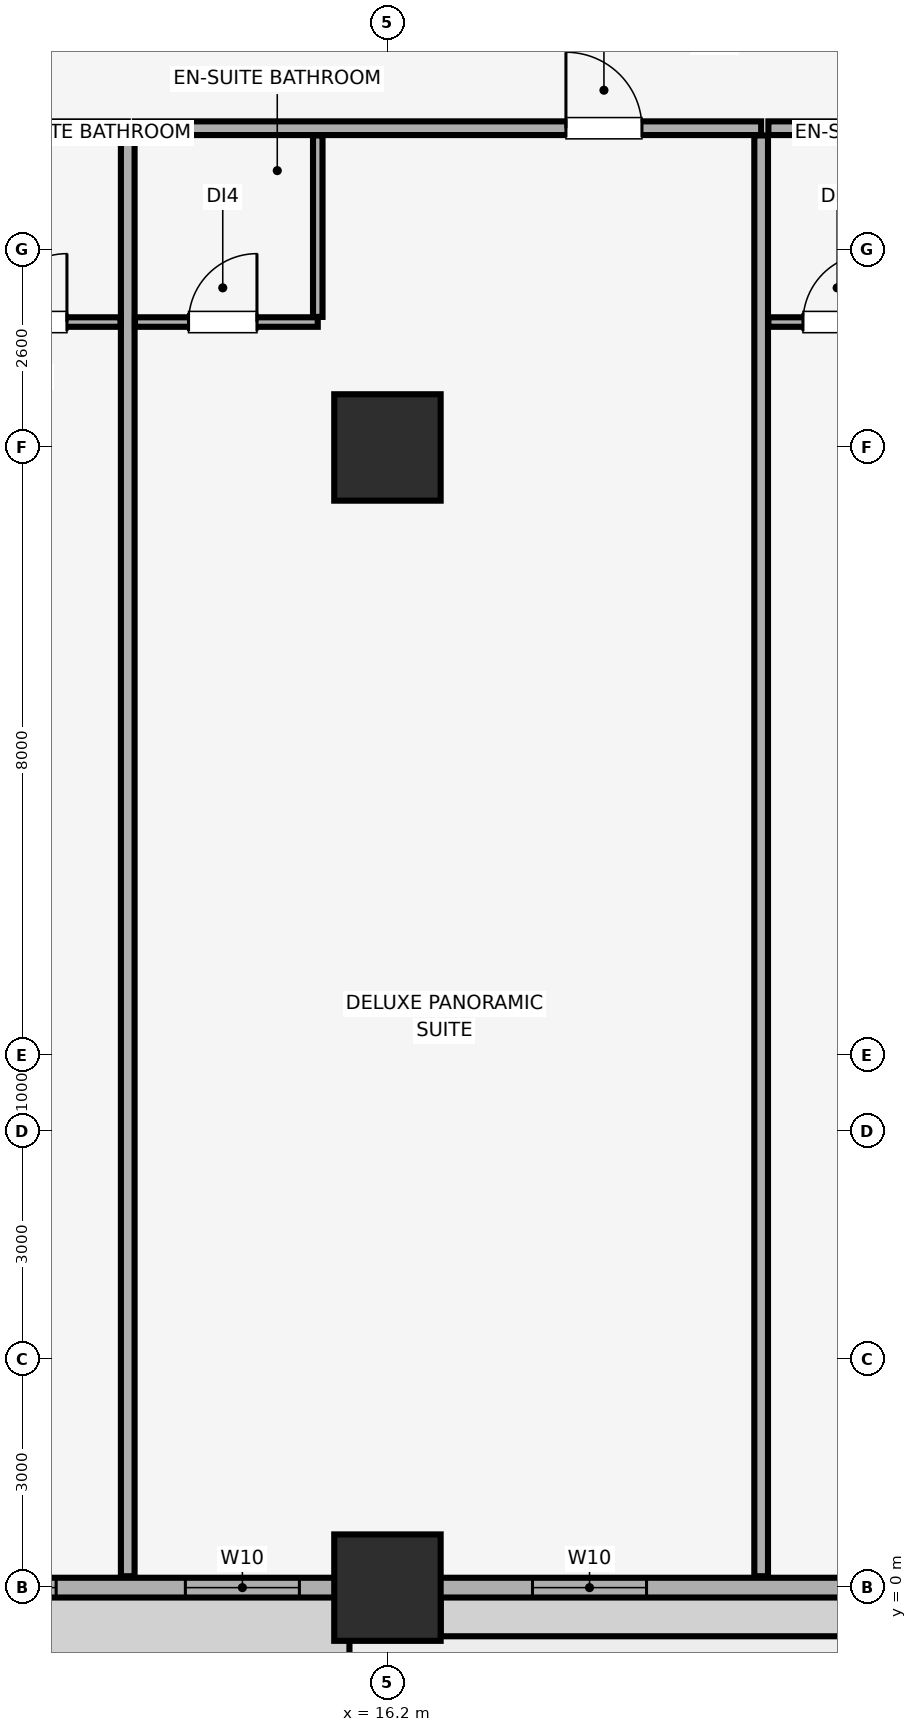
"""IFC4 building model, lengths in metres.
Left out: names, types, materials, properties, quantities, classifications, styles, units other than length and angle.
Written with IfcOpenShell. Run it as: python <this file> out.ifc"""

import sys

from ifc_helpers import new_model, si_unit, direction, frame, frame_2d, origin, origin_2d, place, context, subcontext, project, spatial, rectangle, extrude, element, fill, save


model = new_model("IFC4")
c1 = context("Model", 3, precision=1e-05, world=origin(), true_north=direction((0.0, 1.0)))
c2 = subcontext(c1, "Body", "Model", "MODEL_VIEW")
j1 = project(units=[si_unit("LENGTHUNIT", "METRE"), si_unit("PLANEANGLEUNIT", "RADIAN")], contexts=[c1])
p1 = place(None, origin())
s1 = spatial("IfcSite", under=j1, at=p1, CompositionType="ELEMENT")
p2 = place(p1, origin())
s2 = spatial("IfcBuilding", under=s1, at=p2, CompositionType="ELEMENT")
p3 = place(p2, frame((0.0, 0.0, 76.4)))
s3 = spatial("IfcBuildingStorey", under=s2, at=p3, CompositionType="ELEMENT", Elevation=76.4)
for number, where, z_axis, x_axis in (
    (1, (16.2, 0.0, 0.0), (0.0, 0.0, 1.0), (1.0, 0.0, 0.0)),
    (2, (16.2, 15.0, 0.0), (0.0, 0.0, 1.0), (1.0, 0.0, 0.0)),
):
    element("IfcColumn", number, at=place(p3, frame(where, z_axis=z_axis, x_axis=x_axis)), inside=s3, PredefinedType="COLUMN", context=c2, shape_type="SweptSolid", body=[
        extrude(rectangle(XDim=1.4, YDim=1.4, at=origin_2d()), origin(), (0.0, 0.0, 1.0), 3.4),
    ])
p4 = place(p3, frame((4.2, 0.0, 0.0), z_axis=(0.0, 0.0, 1.0), x_axis=(1.0, 0.0, 0.0)))
e3 = element("IfcWall", 3, at=p4, inside=s3, PredefinedType="SOLIDWALL", context=c2, shape_type="SweptSolid", body=[
    extrude(rectangle(XDim=75.6, YDim=0.26, at=frame_2d((37.8, 0.0))), origin(), (0.0, 0.0, 1.0), 2.45),
])
p5 = place(p4, frame((21.383, 0.0, 0.0)))
e4 = element("IfcOpeningElement", 4, at=p5, cuts=e3, PredefinedType="OPENING", context=c2, shape_type="SweptSolid", body=[
    extrude(rectangle(XDim=1.1, YDim=2.15, at=frame_2d((0.55, 1.075))), frame((0.0, 0.14, 0.0), z_axis=(0.0, -1.0, 0.0), x_axis=(1.0, 0.0, 0.0)), (0.0, 0.0, 1.0), 0.28),
])
p6 = place(p4, frame((37.25, 0.0, 0.0)))
e5 = element("IfcOpeningElement", 5, at=p6, cuts=e3, PredefinedType="OPENING", context=c2, shape_type="SweptSolid", body=[
    extrude(rectangle(XDim=1.1, YDim=2.15, at=frame_2d((0.55, 1.075))), frame((0.0, 0.14, 0.0), z_axis=(0.0, -1.0, 0.0), x_axis=(1.0, 0.0, 0.0)), (0.0, 0.0, 1.0), 0.28),
])
p7 = place(p4, frame((53.117, 0.0, 0.0)))
e6 = element("IfcOpeningElement", 6, at=p7, cuts=e3, PredefinedType="OPENING", context=c2, shape_type="SweptSolid", body=[
    extrude(rectangle(XDim=1.1, YDim=2.15, at=frame_2d((0.55, 1.075))), frame((0.0, 0.14, 0.0), z_axis=(0.0, -1.0, 0.0), x_axis=(1.0, 0.0, 0.0)), (0.0, 0.0, 1.0), 0.28),
])
p8 = place(p4, frame((1.485, 0.0, 0.85)))
e7 = element("IfcOpeningElement", 7, at=p8, cuts=e3, PredefinedType="OPENING", context=c2, shape_type="SweptSolid", body=[
    extrude(rectangle(XDim=1.5, YDim=1.4, at=frame_2d((0.75, 0.7))), frame((0.0, 0.14, 0.0), z_axis=(0.0, -1.0, 0.0), x_axis=(1.0, 0.0, 0.0)), (0.0, 0.0, 1.0), 0.28),
])
p9 = place(p4, frame((6.142, 0.0, 0.85)))
e8 = element("IfcOpeningElement", 8, at=p9, cuts=e3, PredefinedType="OPENING", context=c2, shape_type="SweptSolid", body=[
    extrude(rectangle(XDim=1.5, YDim=1.4, at=frame_2d((0.75, 0.7))), frame((0.0, 0.14, 0.0), z_axis=(0.0, -1.0, 0.0), x_axis=(1.0, 0.0, 0.0)), (0.0, 0.0, 1.0), 0.28),
])
p10 = place(p4, frame((9.342, 0.0, 0.85)))
e9 = element("IfcOpeningElement", 9, at=p10, cuts=e3, PredefinedType="OPENING", context=c2, shape_type="SweptSolid", body=[
    extrude(rectangle(XDim=1.5, YDim=1.4, at=frame_2d((0.75, 0.7))), frame((0.0, 0.14, 0.0), z_axis=(0.0, -1.0, 0.0), x_axis=(1.0, 0.0, 0.0)), (0.0, 0.0, 1.0), 0.28),
])
p11 = place(p4, frame((13.908, 0.0, 0.85)))
e10 = element("IfcOpeningElement", 10, at=p11, cuts=e3, PredefinedType="OPENING", context=c2, shape_type="SweptSolid", body=[
    extrude(rectangle(XDim=1.5, YDim=1.4, at=frame_2d((0.75, 0.7))), frame((0.0, 0.14, 0.0), z_axis=(0.0, -1.0, 0.0), x_axis=(1.0, 0.0, 0.0)), (0.0, 0.0, 1.0), 0.28),
])
p12 = place(p4, frame((23.202, 0.0, 0.85)))
e11 = element("IfcOpeningElement", 11, at=p12, cuts=e3, PredefinedType="OPENING", context=c2, shape_type="SweptSolid", body=[
    extrude(rectangle(XDim=1.5, YDim=1.4, at=frame_2d((0.75, 0.7))), frame((0.0, 0.14, 0.0), z_axis=(0.0, -1.0, 0.0), x_axis=(1.0, 0.0, 0.0)), (0.0, 0.0, 1.0), 0.28),
])
p13 = place(p4, frame((29.25, 0.0, 0.85)))
e12 = element("IfcOpeningElement", 12, at=p13, cuts=e3, PredefinedType="OPENING", context=c2, shape_type="SweptSolid", body=[
    extrude(rectangle(XDim=1.5, YDim=1.4, at=frame_2d((0.75, 0.7))), frame((0.0, 0.14, 0.0), z_axis=(0.0, -1.0, 0.0), x_axis=(1.0, 0.0, 0.0)), (0.0, 0.0, 1.0), 0.28),
])
p14 = place(p4, frame((34.79, 0.0, 0.85)))
e13 = element("IfcOpeningElement", 13, at=p14, cuts=e3, PredefinedType="OPENING", context=c2, shape_type="SweptSolid", body=[
    extrude(rectangle(XDim=1.5, YDim=1.4, at=frame_2d((0.75, 0.7))), frame((0.0, 0.14, 0.0), z_axis=(0.0, -1.0, 0.0), x_axis=(1.0, 0.0, 0.0)), (0.0, 0.0, 1.0), 0.28),
])
p15 = place(p4, frame((39.31, 0.0, 0.85)))
e14 = element("IfcOpeningElement", 14, at=p15, cuts=e3, PredefinedType="OPENING", context=c2, shape_type="SweptSolid", body=[
    extrude(rectangle(XDim=1.5, YDim=1.4, at=frame_2d((0.75, 0.7))), frame((0.0, 0.14, 0.0), z_axis=(0.0, -1.0, 0.0), x_axis=(1.0, 0.0, 0.0)), (0.0, 0.0, 1.0), 0.28),
])
p16 = place(p4, frame((44.85, 0.0, 0.85)))
e15 = element("IfcOpeningElement", 15, at=p16, cuts=e3, PredefinedType="OPENING", context=c2, shape_type="SweptSolid", body=[
    extrude(rectangle(XDim=1.5, YDim=1.4, at=frame_2d((0.75, 0.7))), frame((0.0, 0.14, 0.0), z_axis=(0.0, -1.0, 0.0), x_axis=(1.0, 0.0, 0.0)), (0.0, 0.0, 1.0), 0.28),
])
p17 = place(p4, frame((50.848, 0.0, 0.85)))
e16 = element("IfcOpeningElement", 16, at=p17, cuts=e3, PredefinedType="OPENING", context=c2, shape_type="SweptSolid", body=[
    extrude(rectangle(XDim=1.5, YDim=1.4, at=frame_2d((0.75, 0.7))), frame((0.0, 0.14, 0.0), z_axis=(0.0, -1.0, 0.0), x_axis=(1.0, 0.0, 0.0)), (0.0, 0.0, 1.0), 0.28),
])
p18 = place(p4, frame((60.142, 0.0, 0.85)))
e17 = element("IfcOpeningElement", 17, at=p18, cuts=e3, PredefinedType="OPENING", context=c2, shape_type="SweptSolid", body=[
    extrude(rectangle(XDim=1.5, YDim=1.4, at=frame_2d((0.75, 0.7))), frame((0.0, 0.14, 0.0), z_axis=(0.0, -1.0, 0.0), x_axis=(1.0, 0.0, 0.0)), (0.0, 0.0, 1.0), 0.28),
])
p19 = place(p4, frame((64.708, 0.0, 0.85)))
e18 = element("IfcOpeningElement", 18, at=p19, cuts=e3, PredefinedType="OPENING", context=c2, shape_type="SweptSolid", body=[
    extrude(rectangle(XDim=1.5, YDim=1.4, at=frame_2d((0.75, 0.7))), frame((0.0, 0.14, 0.0), z_axis=(0.0, -1.0, 0.0), x_axis=(1.0, 0.0, 0.0)), (0.0, 0.0, 1.0), 0.28),
])
p20 = place(p4, frame((67.908, 0.0, 0.85)))
e19 = element("IfcOpeningElement", 19, at=p20, cuts=e3, PredefinedType="OPENING", context=c2, shape_type="SweptSolid", body=[
    extrude(rectangle(XDim=1.5, YDim=1.4, at=frame_2d((0.75, 0.7))), frame((0.0, 0.14, 0.0), z_axis=(0.0, -1.0, 0.0), x_axis=(1.0, 0.0, 0.0)), (0.0, 0.0, 1.0), 0.28),
])
p21 = place(p4, frame((72.615, 0.0, 0.85)))
e20 = element("IfcOpeningElement", 20, at=p21, cuts=e3, PredefinedType="OPENING", context=c2, shape_type="SweptSolid", body=[
    extrude(rectangle(XDim=1.5, YDim=1.4, at=frame_2d((0.75, 0.7))), frame((0.0, 0.14, 0.0), z_axis=(0.0, -1.0, 0.0), x_axis=(1.0, 0.0, 0.0)), (0.0, 0.0, 1.0), 0.28),
])
p22 = place(p3, frame((0.15, 19.2, 0.0), z_axis=(0.0, 0.0, 1.0), x_axis=(1.0, 0.0, 0.0)))
e21 = element("IfcWall", 21, at=p22, inside=s3, PredefinedType="PARTITIONING", context=c2, shape_type="SweptSolid", body=[
    extrude(rectangle(XDim=12.633, YDim=0.18, at=frame_2d((6.317, 0.0))), origin(), (0.0, 0.0, 1.0), 3.4),
])
p23 = place(p22, frame((5.685, 0.0, 0.0)))
e22 = element("IfcOpeningElement", 22, at=p23, cuts=e21, PredefinedType="OPENING", context=c2, shape_type="SweptSolid", body=[
    extrude(rectangle(XDim=1.0, YDim=2.15, at=frame_2d((0.5, 1.075))), frame((0.0, 0.1, 0.0), z_axis=(0.0, -1.0, 0.0), x_axis=(1.0, 0.0, 0.0)), (0.0, 0.0, 1.0), 0.2),
])
p24 = place(p3, frame((12.783, 0.15, 0.0), z_axis=(0.0, 0.0, 1.0), x_axis=(0.0, 1.0, 0.0)))
e23 = element("IfcWall", 23, at=p24, inside=s3, PredefinedType="PARTITIONING", context=c2, shape_type="SweptSolid", body=[
    extrude(rectangle(XDim=18.955, YDim=0.18, at=frame_2d((9.478, 0.0))), origin(), (0.0, 0.0, 1.0), 2.8),
])
p25 = place(p3, frame((10.283, 16.65, 0.0), z_axis=(0.0, 0.0, 1.0), x_axis=(1.0, 0.0, 0.0)))
e24 = element("IfcWall", 24, at=p25, inside=s3, PredefinedType="PARTITIONING", context=c2, shape_type="SweptSolid", body=[
    extrude(rectangle(XDim=2.405, YDim=0.125, at=frame_2d((1.203, 0.0))), origin(), (0.0, 0.0, 1.0), 3.4),
])
p26 = place(p25, frame((0.8, 0.0, 0.0)))
e25 = element("IfcOpeningElement", 25, at=p26, cuts=e24, PredefinedType="OPENING", context=c2, shape_type="SweptSolid", body=[
    extrude(rectangle(XDim=0.9, YDim=2.1, at=frame_2d((0.45, 1.05))), frame((0.0, 0.073, 0.0), z_axis=(0.0, -1.0, 0.0), x_axis=(1.0, 0.0, 0.0)), (0.0, 0.0, 1.0), 0.145),
])
p27 = place(p3, frame((12.878, 19.2, 0.0), z_axis=(0.0, 0.0, 1.0), x_axis=(1.0, 0.0, 0.0)))
e26 = element("IfcWall", 26, at=p27, inside=s3, PredefinedType="PARTITIONING", context=c2, shape_type="SweptSolid", body=[
    extrude(rectangle(XDim=8.238, YDim=0.18, at=frame_2d((4.119, 0.0))), origin(), (0.0, 0.0, 1.0), 3.4),
])
p28 = place(p27, frame((5.67, 0.0, 0.0)))
e27 = element("IfcOpeningElement", 27, at=p28, cuts=e26, PredefinedType="OPENING", context=c2, shape_type="SweptSolid", body=[
    extrude(rectangle(XDim=1.0, YDim=2.15, at=frame_2d((0.5, 1.075))), frame((0.0, 0.1, 0.0), z_axis=(0.0, -1.0, 0.0), x_axis=(1.0, 0.0, 0.0)), (0.0, 0.0, 1.0), 0.2),
])
p29 = place(p3, frame((21.117, 0.15, 0.0), z_axis=(0.0, 0.0, 1.0), x_axis=(0.0, 1.0, 0.0)))
e28 = element("IfcWall", 28, at=p29, inside=s3, PredefinedType="PARTITIONING", context=c2, shape_type="SweptSolid", body=[
    extrude(rectangle(XDim=18.955, YDim=0.18, at=frame_2d((9.478, 0.0))), origin(), (0.0, 0.0, 1.0), 3.4),
])
p30 = place(p3, frame((12.878, 16.65, 0.0), z_axis=(0.0, 0.0, 1.0), x_axis=(1.0, 0.0, 0.0)))
e29 = element("IfcWall", 29, at=p30, inside=s3, PredefinedType="PARTITIONING", context=c2, shape_type="SweptSolid", body=[
    extrude(rectangle(XDim=2.405, YDim=0.125, at=frame_2d((1.202, 0.0))), origin(), (0.0, 0.0, 1.0), 3.4),
])
p31 = place(p30, frame((0.705, 0.0, 0.0)))
e30 = element("IfcOpeningElement", 30, at=p31, cuts=e29, PredefinedType="OPENING", context=c2, shape_type="SweptSolid", body=[
    extrude(rectangle(XDim=0.9, YDim=2.1, at=frame_2d((0.45, 1.05))), frame((0.0, 0.073, 0.0), z_axis=(0.0, -1.0, 0.0), x_axis=(1.0, 0.0, 0.0)), (0.0, 0.0, 1.0), 0.145),
])
p32 = place(p3, frame((15.283, 16.718, 0.0), z_axis=(0.0, 0.0, 1.0), x_axis=(0.0, 1.0, 0.0)))
e31 = element("IfcWall", 31, at=p32, inside=s3, PredefinedType="PARTITIONING", context=c2, shape_type="SweptSolid", body=[
    extrude(rectangle(XDim=2.387, YDim=0.125, at=frame_2d((1.194, 0.0))), origin(), (0.0, 0.0, 1.0), 3.4),
])
p33 = place(p3, frame((21.212, 19.2, 0.0), z_axis=(0.0, 0.0, 1.0), x_axis=(1.0, 0.0, 0.0)))
e32 = element("IfcWall", 32, at=p33, inside=s3, PredefinedType="PARTITIONING", context=c2, shape_type="SweptSolid", body=[
    extrude(rectangle(XDim=8.238, YDim=0.18, at=frame_2d((4.119, 0.0))), origin(), (0.0, 0.0, 1.0), 3.4),
])
p34 = place(p33, frame((5.271, 0.0, 0.0)))
e33 = element("IfcOpeningElement", 33, at=p34, cuts=e32, PredefinedType="OPENING", context=c2, shape_type="SweptSolid", body=[
    extrude(rectangle(XDim=1.0, YDim=2.15, at=frame_2d((0.5, 1.075))), frame((0.0, 0.1, 0.0), z_axis=(0.0, -1.0, 0.0), x_axis=(1.0, 0.0, 0.0)), (0.0, 0.0, 1.0), 0.2),
])
p35 = place(p3, frame((21.212, 16.65, 0.0), z_axis=(0.0, 0.0, 1.0), x_axis=(1.0, 0.0, 0.0)))
e34 = element("IfcWall", 34, at=p35, inside=s3, PredefinedType="PARTITIONING", context=c2, shape_type="SweptSolid", body=[
    extrude(rectangle(XDim=2.405, YDim=0.125, at=frame_2d((1.203, 0.0))), origin(), (0.0, 0.0, 1.0), 3.4),
])
p36 = place(p35, frame((0.455, 0.0, 0.0)))
e35 = element("IfcOpeningElement", 35, at=p36, cuts=e34, PredefinedType="OPENING", context=c2, shape_type="SweptSolid", body=[
    extrude(rectangle(XDim=0.9, YDim=2.1, at=frame_2d((0.45, 1.05))), frame((0.0, 0.073, 0.0), z_axis=(0.0, -1.0, 0.0), x_axis=(1.0, 0.0, 0.0)), (0.0, 0.0, 1.0), 0.145),
])
p37 = place(p9, origin())
e36 = element("IfcWindow", 36, at=p37, inside=s3, PartitioningType="SINGLE_PANEL", PredefinedType="WINDOW", context=c2, shape_type="SweptSolid", body=[
    extrude(rectangle(XDim=1.5, YDim=1.4, at=frame_2d((0.75, 0.7))), frame((0.0, 0.03, 0.0), z_axis=(0.0, -1.0, 0.0), x_axis=(1.0, 0.0, 0.0)), (0.0, 0.0, 1.0), 0.06),
])
fill(e8, e36)
p38 = place(p10, origin())
e37 = element("IfcWindow", 37, at=p38, inside=s3, PartitioningType="SINGLE_PANEL", PredefinedType="WINDOW", context=c2, shape_type="SweptSolid", body=[
    extrude(rectangle(XDim=1.5, YDim=1.4, at=frame_2d((0.75, 0.7))), frame((0.0, 0.03, 0.0), z_axis=(0.0, -1.0, 0.0), x_axis=(1.0, 0.0, 0.0)), (0.0, 0.0, 1.0), 0.06),
])
fill(e9, e37)
p39 = place(p11, origin())
e38 = element("IfcWindow", 38, at=p39, inside=s3, PartitioningType="SINGLE_PANEL", PredefinedType="WINDOW", context=c2, shape_type="SweptSolid", body=[
    extrude(rectangle(XDim=1.5, YDim=1.4, at=frame_2d((0.75, 0.7))), frame((0.0, 0.03, 0.0), z_axis=(0.0, -1.0, 0.0), x_axis=(1.0, 0.0, 0.0)), (0.0, 0.0, 1.0), 0.06),
])
fill(e10, e38)
p40 = place(p26, origin())
e39 = element("IfcDoor", 39, at=p40, inside=s3, OperationType="SINGLE_SWING_RIGHT", PredefinedType="DOOR", context=c2, shape_type="SweptSolid", body=[
    extrude(rectangle(XDim=0.9, YDim=2.1, at=frame_2d((0.45, 1.05))), frame((0.0, 0.025, 0.0), z_axis=(0.0, -1.0, 0.0), x_axis=(1.0, 0.0, 0.0)), (0.0, 0.0, 1.0), 0.05),
])
fill(e25, e39)
p41 = place(p28, origin())
e40 = element("IfcDoor", 40, at=p41, inside=s3, OperationType="SINGLE_SWING_LEFT", PredefinedType="DOOR", context=c2, shape_type="SweptSolid", body=[
    extrude(rectangle(XDim=1.0, YDim=2.15, at=frame_2d((0.5, 1.075))), frame((0.0, 0.025, 0.0), z_axis=(0.0, -1.0, 0.0), x_axis=(1.0, 0.0, 0.0)), (0.0, 0.0, 1.0), 0.05),
])
fill(e27, e40)
p42 = place(p31, origin())
e41 = element("IfcDoor", 41, at=p42, inside=s3, OperationType="SINGLE_SWING_RIGHT", PredefinedType="DOOR", context=c2, shape_type="SweptSolid", body=[
    extrude(rectangle(XDim=0.9, YDim=2.1, at=frame_2d((0.45, 1.05))), frame((0.0, 0.025, 0.0), z_axis=(0.0, -1.0, 0.0), x_axis=(1.0, 0.0, 0.0)), (0.0, 0.0, 1.0), 0.05),
])
fill(e30, e41)
p43 = place(p36, origin())
e42 = element("IfcDoor", 42, at=p43, inside=s3, OperationType="SINGLE_SWING_RIGHT", PredefinedType="DOOR", context=c2, shape_type="SweptSolid", body=[
    extrude(rectangle(XDim=0.9, YDim=2.1, at=frame_2d((0.45, 1.05))), frame((0.0, 0.025, 0.0), z_axis=(0.0, -1.0, 0.0), x_axis=(1.0, 0.0, 0.0)), (0.0, 0.0, 1.0), 0.05),
])
fill(e35, e42)
save(model, sys.argv[1])
